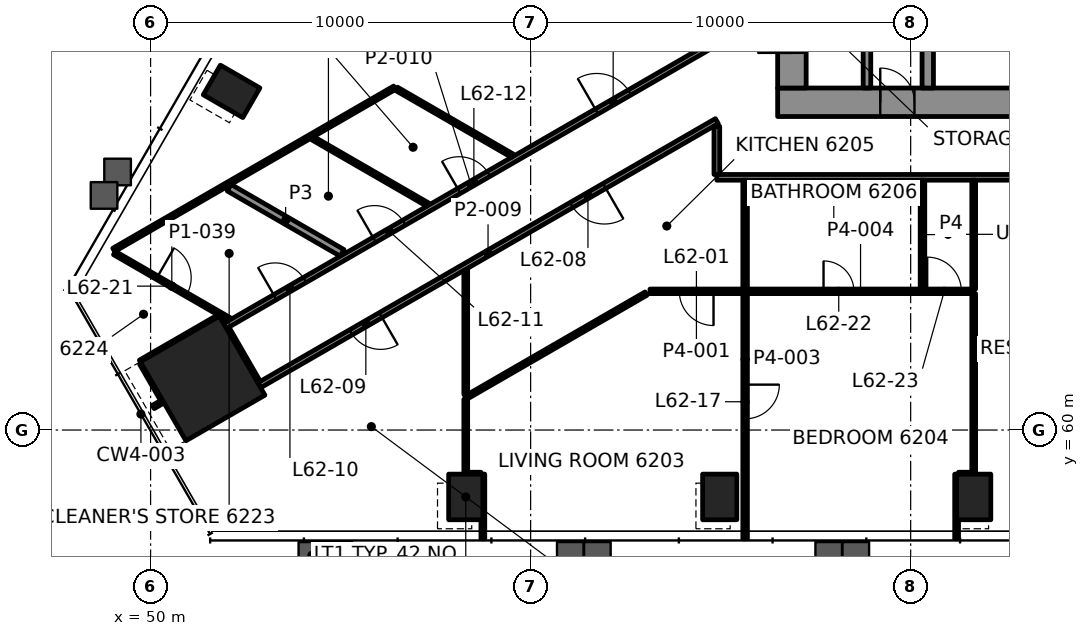
"""IFC4 building model, lengths in metres.
Left out: names, types, materials, properties, quantities, classifications, styles, units other than length and angle.
Written with IfcOpenShell. Run it as: python <this file> out.ifc"""

import sys

from ifc_helpers import new_model, si_unit, direction, frame, frame_2d, origin, origin_2d, place, context, subcontext, project, spatial, rectangle, hollow_rectangle, extrude, element, fill, save


model = new_model("IFC4")
c1 = context("Model", 3, precision=1e-05, world=origin(), true_north=direction((0.0, 1.0)))
c2 = subcontext(c1, "Body", "Model", "MODEL_VIEW")
j1 = project(units=[si_unit("LENGTHUNIT", "METRE"), si_unit("PLANEANGLEUNIT", "RADIAN")], contexts=[c1])
p1 = place(None, origin())
s1 = spatial("IfcSite", under=j1, at=p1, CompositionType="ELEMENT")
p2 = place(p1, origin())
s2 = spatial("IfcBuilding", under=s1, at=p2, CompositionType="ELEMENT")
p3 = place(p2, frame((0.0, 0.0, 263.6)))
s3 = spatial("IfcBuildingStorey", under=s2, at=p3, CompositionType="ELEMENT", Elevation=263.6)
p4 = place(p3, frame((51.37, 61.357, 0.0), z_axis=(0.0, 0.0, 1.0), x_axis=(0.5, -0.866025403784, 0.0)))
e1 = element("IfcColumn", 1, at=p4, inside=s3, PredefinedType="COLUMN", context=c2, shape_type="SweptSolid", body=[
    extrude(rectangle(XDim=2.4, YDim=2.4, at=origin_2d()), origin(), (0.0, 0.0, 1.0), 3.5),
])
for number, where, z_axis, x_axis in (
    (2, (58.293, 58.239, -0.0), (0.0, 0.0, 1.0), (1.0, 0.0, 0.0)),
    (3, (64.976, 58.239, -0.0), (0.0, 0.0, 1.0), (1.0, 0.0, 0.0)),
    (4, (71.659, 58.239, -0.0), (0.0, 0.0, 1.0), (1.0, 0.0, 0.0)),
    (5, (52.131, 68.912, -0.0), (0.0, 0.0, 1.0), (-0.5, -0.866, 0.0)),
):
    element("IfcColumn", number, at=place(p3, frame(where, z_axis=z_axis, x_axis=x_axis)), inside=s3, PredefinedType="COLUMN", context=c2, shape_type="SweptSolid", body=[
        extrude(hollow_rectangle(XDim=0.9, YDim=1.2, WallThickness=0.06, at=origin_2d()), origin(), (0.0, 0.0, 1.0), 3.5),
    ])
p5 = place(p3, frame((66.5, 68.625, 0.0), z_axis=(0.0, 0.0, 1.0), x_axis=(1.0, 0.0, 0.0)))
e6 = element("IfcWall", 6, at=p5, inside=s3, PredefinedType="SHEAR", context=c2, shape_type="SweptSolid", body=[
    extrude(rectangle(XDim=17.0, YDim=0.75, at=frame_2d((8.5, 0.0))), origin(), (0.0, 0.0, 1.0), 3.3),
])
p6 = place(p5, frame((2.7, 0.0, 0.0)))
e7 = element("IfcOpeningElement", 7, at=p6, cuts=e6, PredefinedType="OPENING", context=c2, shape_type="SweptSolid", body=[
    extrude(rectangle(XDim=0.9, YDim=2.1, at=frame_2d((0.45, 1.05))), frame((0.0, 0.385, 0.0), z_axis=(0.0, -1.0, 0.0), x_axis=(1.0, 0.0, 0.0)), (0.0, 0.0, 1.0), 0.77),
])
p7 = place(p3, frame((66.875, 69.0, 0.0), z_axis=(0.0, 0.0, 1.0), x_axis=(0.0, 1.0, 0.0)))
e8 = element("IfcWall", 8, at=p7, inside=s3, PredefinedType="SHEAR", context=c2, shape_type="SweptSolid", body=[
    extrude(rectangle(XDim=12.0, YDim=0.75, at=frame_2d((6.0, 0.0))), origin(), (0.0, 0.0, 1.0), 3.3),
])
p8 = place(p7, frame((3.7, 0.0, 0.0)))
e9 = element("IfcOpeningElement", 9, at=p8, cuts=e8, PredefinedType="OPENING", context=c2, shape_type="SweptSolid", body=[
    extrude(rectangle(XDim=1.2, YDim=2.1, at=frame_2d((0.6, 1.05))), frame((0.0, 0.385, 0.0), z_axis=(0.0, -1.0, 0.0), x_axis=(1.0, 0.0, 0.0)), (0.0, 0.0, 1.0), 0.77),
])
p9 = place(p7, frame((0.925, 0.0, 0.0)))
e10 = element("IfcOpeningElement", 10, at=p9, cuts=e8, PredefinedType="OPENING", context=c2, shape_type="SweptSolid", body=[
    extrude(rectangle(XDim=0.9, YDim=2.1, at=frame_2d((0.45, 1.05))), frame((0.0, 0.385, 0.0), z_axis=(0.0, -1.0, 0.0), x_axis=(1.0, 0.0, 0.0)), (0.0, 0.0, 1.0), 0.77),
])
p10 = place(p3, frame((70.45, 69.0, 0.0), z_axis=(0.0, 0.0, 1.0), x_axis=(0.0, 1.0, 0.0)))
e11 = element("IfcWall", 11, at=p10, inside=s3, PredefinedType="SHEAR", context=c2, shape_type="SweptSolid", body=[
    extrude(rectangle(XDim=2.6, YDim=0.3, at=frame_2d((1.3, 0.0))), origin(), (0.0, 0.0, 1.0), 3.3),
])
p11 = place(p3, frame((58.343, 58.839, 0.0), z_axis=(0.0, 0.0, 1.0), x_axis=(1.0, 0.0, 0.0)))
e12 = element("IfcWall", 12, at=p11, inside=s3, PredefinedType="PARTITIONING", context=c2, shape_type="SweptSolid", body=[
    extrude(rectangle(XDim=0.35, YDim=0.1, at=frame_2d((0.175, 0.0))), origin(), (0.0, 0.0, 1.0), 2.7),
])
p12 = place(p3, frame((71.259, 58.839, 0.0), z_axis=(0.0, 0.0, 1.0), x_axis=(1.0, 0.0, 0.0)))
e13 = element("IfcWall", 13, at=p12, inside=s3, PredefinedType="PARTITIONING", context=c2, shape_type="SweptSolid", body=[
    extrude(rectangle(XDim=0.349, YDim=0.1, at=frame_2d((0.174, 0.0))), origin(), (0.0, 0.0, 1.0), 2.7),
])
p13 = place(p3, frame((65.584, 63.65, 0.0), z_axis=(0.0, 0.0, 1.0), x_axis=(-1.0, 0.0, 0.0)))
e14 = element("IfcWall", 14, at=p13, inside=s3, PredefinedType="PARTITIONING", context=c2, shape_type="SweptSolid", body=[
    extrude(rectangle(XDim=2.443, YDim=0.12, at=frame_2d((1.221, 0.0))), origin(), (0.0, 0.0, 1.0), 2.7),
])
p14 = place(p13, frame((0.771, 0.0, 0.0)))
e15 = element("IfcOpeningElement", 15, at=p14, cuts=e14, PredefinedType="OPENING", context=c2, shape_type="SweptSolid", body=[
    extrude(rectangle(XDim=0.9, YDim=2.1, at=frame_2d((0.45, 1.05))), frame((0.0, 0.07, 0.0), z_axis=(0.0, -1.0, 0.0), x_axis=(1.0, 0.0, 0.0)), (0.0, 0.0, 1.0), 0.14),
])
p15 = place(p3, frame((85.1, 66.65, 0.0), z_axis=(0.0, 0.0, 1.0), x_axis=(-1.0, 0.0, 0.0)))
e16 = element("IfcWall", 16, at=p15, inside=s3, PredefinedType="PARTITIONING", context=c2, shape_type="SweptSolid", body=[
    extrude(rectangle(XDim=20.2, YDim=0.15, at=frame_2d((10.1, 0.0))), origin(), (0.0, 0.0, 1.0), 2.7),
])
p16 = place(p15, frame((1.61, 0.0, 0.0)))
e17 = element("IfcOpeningElement", 17, at=p16, cuts=e16, PredefinedType="OPENING", context=c2, shape_type="SweptSolid", body=[
    extrude(rectangle(XDim=1.0, YDim=2.1, at=frame_2d((0.5, 1.05))), frame((0.0, 0.085, 0.0), z_axis=(0.0, -1.0, 0.0), x_axis=(1.0, 0.0, 0.0)), (0.0, 0.0, 1.0), 0.17),
])
p17 = place(p15, frame((8.229, 0.0, 0.0)))
e18 = element("IfcOpeningElement", 18, at=p17, cuts=e16, PredefinedType="OPENING", context=c2, shape_type="SweptSolid", body=[
    extrude(rectangle(XDim=1.0, YDim=2.1, at=frame_2d((0.5, 1.05))), frame((0.0, 0.085, 0.0), z_axis=(0.0, -1.0, 0.0), x_axis=(1.0, 0.0, 0.0)), (0.0, 0.0, 1.0), 0.17),
])
p18 = place(p3, frame((58.293, 60.851, 0.0), z_axis=(0.0, 0.0, 1.0), x_axis=(0.866026762963, 0.499997645826, 0.0)))
e19 = element("IfcWall", 19, at=p18, inside=s3, PredefinedType="PARTITIONING", context=c2, shape_type="SweptSolid", body=[
    extrude(rectangle(XDim=5.478, YDim=0.1, at=frame_2d((2.739, 0.0))), origin(), (0.0, 0.0, 1.0), 2.7),
])
p19 = place(p3, frame((64.9, 68.13, 0.0), z_axis=(0.0, 0.0, 1.0), x_axis=(-0.866020369651, -0.500008719273, 0.0)))
e20 = element("IfcWall", 20, at=p19, inside=s3, PredefinedType="PARTITIONING", context=c2, shape_type="SweptSolid", body=[
    extrude(rectangle(XDim=13.904, YDim=0.15, at=frame_2d((6.952, 0.0))), origin(), (0.0, 0.0, 1.0), 2.547),
])
p20 = place(p19, frame((3.416, 0.0, 0.0)))
e21 = element("IfcOpeningElement", 21, at=p20, cuts=e20, PredefinedType="OPENING", context=c2, shape_type="SweptSolid", body=[
    extrude(rectangle(XDim=1.0, YDim=2.1, at=frame_2d((0.5, 1.05))), frame((0.0, 0.085, 0.0), z_axis=(0.0, -1.0, 0.0), x_axis=(1.0, 0.0, 0.0)), (0.0, 0.0, 1.0), 0.17),
])
p21 = place(p19, frame((10.215, 0.0, 0.0)))
e22 = element("IfcOpeningElement", 22, at=p21, cuts=e20, PredefinedType="OPENING", context=c2, shape_type="SweptSolid", body=[
    extrude(rectangle(XDim=0.9, YDim=2.1, at=frame_2d((0.45, 1.05))), frame((0.0, 0.085, 0.0), z_axis=(0.0, -1.0, 0.0), x_axis=(1.0, 0.0, 0.0)), (0.0, 0.0, 1.0), 0.17),
])
p22 = place(p3, frame((50.07, 60.607, 0.0), z_axis=(0.0, 0.0, 1.0), x_axis=(0.866071776036, 0.499919672301, 0.0)))
e23 = element("IfcWall", 23, at=p22, inside=s3, PredefinedType="PARTITIONING", context=c2, shape_type="SweptSolid", body=[
    extrude(rectangle(XDim=0.25, YDim=0.1, at=frame_2d((0.125, 0.0))), origin(), (0.0, 0.0, 1.0), 2.7),
])
p23 = place(p3, frame((51.959, 62.736, 0.0), z_axis=(0.0, 0.0, 1.0), x_axis=(0.866022614424, 0.500004831283, 0.0)))
e24 = element("IfcWall", 24, at=p23, inside=s3, PredefinedType="PARTITIONING", context=c2, shape_type="SweptSolid", body=[
    extrude(rectangle(XDim=14.943, YDim=0.15, at=frame_2d((7.472, 0.0))), origin(), (0.0, 0.0, 1.0), 2.7),
])
p24 = place(p23, frame((1.522, 0.0, 0.0)))
e25 = element("IfcOpeningElement", 25, at=p24, cuts=e24, PredefinedType="OPENING", context=c2, shape_type="SweptSolid", body=[
    extrude(rectangle(XDim=0.9, YDim=2.1, at=frame_2d((0.45, 1.05))), frame((0.0, 0.085, 0.0), z_axis=(0.0, -1.0, 0.0), x_axis=(1.0, 0.0, 0.0)), (0.0, 0.0, 1.0), 0.17),
])
p25 = place(p23, frame((4.539, 0.0, 0.0)))
e26 = element("IfcOpeningElement", 26, at=p25, cuts=e24, PredefinedType="OPENING", context=c2, shape_type="SweptSolid", body=[
    extrude(rectangle(XDim=0.9, YDim=2.1, at=frame_2d((0.45, 1.05))), frame((0.0, 0.085, 0.0), z_axis=(0.0, -1.0, 0.0), x_axis=(1.0, 0.0, 0.0)), (0.0, 0.0, 1.0), 0.17),
])
p26 = place(p23, frame((7.111, 0.0, 0.0)))
e27 = element("IfcOpeningElement", 27, at=p26, cuts=e24, PredefinedType="OPENING", context=c2, shape_type="SweptSolid", body=[
    extrude(rectangle(XDim=0.9, YDim=2.1, at=frame_2d((0.45, 1.05))), frame((0.0, 0.085, 0.0), z_axis=(0.0, -1.0, 0.0), x_axis=(1.0, 0.0, 0.0)), (0.0, 0.0, 1.0), 0.17),
])
p27 = place(p23, frame((11.294, 0.0, 0.0)))
e28 = element("IfcOpeningElement", 28, at=p27, cuts=e24, PredefinedType="OPENING", context=c2, shape_type="SweptSolid", body=[
    extrude(rectangle(XDim=1.0, YDim=2.1, at=frame_2d((0.5, 1.05))), frame((0.0, 0.085, 0.0), z_axis=(0.0, -1.0, 0.0), x_axis=(1.0, 0.0, 0.0)), (0.0, 0.0, 1.0), 0.17),
])
p28 = place(p3, frame((49.73, 61.796, 0.0), z_axis=(0.0, 0.0, 1.0), x_axis=(0.86603458294, 0.499984100898, 0.0)))
e29 = element("IfcWall", 29, at=p28, inside=s3, PredefinedType="PARTITIONING", context=c2, shape_type="SweptSolid", body=[
    extrude(rectangle(XDim=2.342, YDim=0.1, at=frame_2d((1.171, 0.0))), origin(), (0.0, 0.0, 1.0), 2.7),
])
p29 = place(p3, frame((49.03, 64.741, 0.0), z_axis=(0.0, 0.0, 1.0), x_axis=(0.866019796467, 0.500009712033, 0.0)))
e30 = element("IfcWall", 30, at=p29, inside=s3, PredefinedType="PARTITIONING", context=c2, shape_type="SweptSolid", body=[
    extrude(rectangle(XDim=8.534, YDim=0.1, at=frame_2d((4.267, 0.0))), origin(), (0.0, 0.0, 1.0), 2.7),
])
p30 = place(p3, frame((71.659, 58.84, 0.0), z_axis=(0.0, 0.0, 1.0), x_axis=(0.0, 1.0, 0.0)))
e31 = element("IfcWall", 31, at=p30, inside=s3, PredefinedType="PARTITIONING", context=c2, shape_type="SweptSolid", body=[
    extrude(rectangle(XDim=4.75, YDim=0.1, at=frame_2d((2.375, 0.0))), origin(), (0.0, 0.0, 1.0), 2.7),
])
p31 = place(p3, frame((71.209, 57.139, 0.0), z_axis=(0.0, 0.0, 1.0), x_axis=(0.0, 1.0, 0.0)))
e32 = element("IfcWall", 32, at=p31, inside=s3, PredefinedType="PARTITIONING", context=c2, shape_type="SweptSolid", body=[
    extrude(rectangle(XDim=1.699, YDim=0.1, at=frame_2d((0.85, 0.0))), origin(), (0.0, 0.0, 1.0), 2.688),
])
p32 = place(p3, frame((70.311, 63.71, 0.0), z_axis=(0.0, 0.0, 1.0), x_axis=(0.0, 1.0, 0.0)))
e33 = element("IfcWall", 33, at=p32, inside=s3, PredefinedType="PARTITIONING", context=c2, shape_type="SweptSolid", body=[
    extrude(rectangle(XDim=2.865, YDim=0.12, at=frame_2d((1.433, 0.0))), origin(), (0.0, 0.0, 1.0), 2.7),
])
p33 = place(p3, frame((65.644, 66.575, 0.0), z_axis=(0.0, 0.0, 1.0), x_axis=(0.0, -1.0, 0.0)))
e34 = element("IfcWall", 34, at=p33, inside=s3, PredefinedType="PARTITIONING", context=c2, shape_type="SweptSolid", body=[
    extrude(rectangle(XDim=9.436, YDim=0.12, at=frame_2d((4.718, 0.0))), origin(), (0.0, 0.0, 1.0), 2.688),
])
p34 = place(p33, frame((5.38, 0.0, 0.0)))
e35 = element("IfcOpeningElement", 35, at=p34, cuts=e34, PredefinedType="OPENING", context=c2, shape_type="SweptSolid", body=[
    extrude(rectangle(XDim=0.9, YDim=2.1, at=frame_2d((0.45, 1.05))), frame((0.0, 0.07, 0.0), z_axis=(0.0, -1.0, 0.0), x_axis=(1.0, 0.0, 0.0)), (0.0, 0.0, 1.0), 0.14),
])
p35 = place(p3, frame((64.9, 66.725, 0.0), z_axis=(0.0, 0.0, 1.0), x_axis=(0.0, 1.0, 0.0)))
e36 = element("IfcWall", 36, at=p35, inside=s3, PredefinedType="PARTITIONING", context=c2, shape_type="SweptSolid", body=[
    extrude(rectangle(XDim=1.268, YDim=0.15, at=frame_2d((0.634, 0.0))), origin(), (0.0, 0.0, 1.0), 2.547),
])
p36 = place(p3, frame((58.743, 57.139, 0.0), z_axis=(0.0, 0.0, 1.0), x_axis=(0.0, 1.0, 0.0)))
e37 = element("IfcWall", 37, at=p36, inside=s3, PredefinedType="PARTITIONING", context=c2, shape_type="SweptSolid", body=[
    extrude(rectangle(XDim=1.699, YDim=0.1, at=frame_2d((0.85, 0.0))), origin(), (0.0, 0.0, 1.0), 2.688),
])
p37 = place(p3, frame((58.293, 58.839, 0.0), z_axis=(0.0, 0.0, 1.0), x_axis=(0.0, 1.0, 0.0)))
e38 = element("IfcWall", 38, at=p37, inside=s3, PredefinedType="PARTITIONING", context=c2, shape_type="SweptSolid", body=[
    extrude(rectangle(XDim=1.969, YDim=0.1, at=frame_2d((0.984, 0.0))), origin(), (0.0, 0.0, 1.0), 2.7),
])
p38 = place(p3, frame((52.821, 61.243, 0.0), z_axis=(0.0, 0.0, 1.0), x_axis=(-0.499970888758, 0.866042210515, 0.0)))
e39 = element("IfcWall", 39, at=p38, inside=s3, PredefinedType="PARTITIONING", context=c2, shape_type="SweptSolid", body=[
    extrude(rectangle(XDim=1.645, YDim=0.15, at=frame_2d((0.822, 0.0))), origin(), (0.0, 0.0, 1.0), 2.547),
])
p39 = place(p3, frame((50.331, 60.757, 0.0), z_axis=(0.0, 0.0, 1.0), x_axis=(-0.500157339417, 0.865934544771, 0.0)))
e40 = element("IfcWall", 40, at=p39, inside=s3, PredefinedType="PARTITIONING", context=c2, shape_type="SweptSolid", body=[
    extrude(rectangle(XDim=1.15, YDim=0.1, at=frame_2d((0.575, 0.0))), origin(), (0.0, 0.0, 1.0), 2.7),
])
p40 = place(p3, frame((59.52, 67.219, 0.0), z_axis=(0.0, 0.0, 1.0), x_axis=(-0.866011216541, 0.500024572222, 0.0)))
e41 = element("IfcWall", 41, at=p40, inside=s3, PredefinedType="PARTITIONING", context=c2, shape_type="SweptSolid", body=[
    extrude(rectangle(XDim=3.521, YDim=0.1, at=frame_2d((1.76, 0.0))), origin(), (0.0, 0.0, 1.0), 2.7),
])
p41 = place(p3, frame((57.292, 65.932, 0.0), z_axis=(0.0, 0.0, 1.0), x_axis=(-0.866017863565, 0.500013059815, 0.0)))
e42 = element("IfcWall", 42, at=p41, inside=s3, PredefinedType="PARTITIONING", context=c2, shape_type="SweptSolid", body=[
    extrude(rectangle(XDim=3.491, YDim=0.1, at=frame_2d((1.745, 0.0))), origin(), (0.0, 0.0, 1.0), 2.7),
])
p42 = place(p3, frame((55.039, 64.662, 0.0), z_axis=(0.0, 0.0, 1.0), x_axis=(-0.866036273972, 0.49998117181, 0.0)))
e43 = element("IfcWall", 43, at=p42, inside=s3, PredefinedType="PARTITIONING", context=c2, shape_type="SweptSolid", body=[
    extrude(rectangle(XDim=3.431, YDim=0.2, at=frame_2d((1.715, 0.0))), origin(), (0.0, 0.0, 1.0), 2.7),
])
p43 = place(p3, frame((49.049, 64.658, 0.0), z_axis=(0.0, 0.0, 1.0), x_axis=(0.866031592922, -0.499989279946, 0.0)))
e44 = element("IfcWall", 44, at=p43, inside=s3, PredefinedType="PARTITIONING", context=c2, shape_type="SweptSolid", body=[
    extrude(rectangle(XDim=3.485, YDim=0.1, at=frame_2d((1.742, 0.0))), origin(), (0.0, 0.0, 1.0), 2.7),
])
p44 = place(p43, frame((1.292, 0.0, 0.0)))
e45 = element("IfcOpeningElement", 45, at=p44, cuts=e44, PredefinedType="OPENING", context=c2, shape_type="SweptSolid", body=[
    extrude(rectangle(XDim=0.9, YDim=2.1, at=frame_2d((0.45, 1.05))), frame((0.0, 0.06, 0.0), z_axis=(0.0, -1.0, 0.0), x_axis=(1.0, 0.0, 0.0)), (0.0, 0.0, 1.0), 0.12),
])
p45 = place(p3, frame((71.659, 63.71, 0.0), z_axis=(0.0, 0.0, 1.0), x_axis=(0.0, 1.0, 0.0)))
e46 = element("IfcWall", 46, at=p45, inside=s3, PredefinedType="PARTITIONING", context=c2, shape_type="SweptSolid", body=[
    extrude(rectangle(XDim=2.865, YDim=0.1, at=frame_2d((1.433, 0.0))), origin(), (0.0, 0.0, 1.0), 2.7),
])
p46 = place(p3, frame((58.293, 60.938, 0.0), z_axis=(0.0, 0.0, 1.0), x_axis=(0.0, 1.0, 0.0)))
e47 = element("IfcWall", 47, at=p46, inside=s3, PredefinedType="PARTITIONING", context=c2, shape_type="SweptSolid", body=[
    extrude(rectangle(XDim=3.261, YDim=0.1, at=frame_2d((1.63, 0.0))), origin(), (0.0, 0.0, 1.0), 2.7),
])
p47 = place(p3, frame((65.704, 63.65, 0.0), z_axis=(0.0, 0.0, 1.0), x_axis=(1.0, 0.0, 0.0)))
e48 = element("IfcWall", 48, at=p47, inside=s3, PredefinedType="PARTITIONING", context=c2, shape_type="SweptSolid", body=[
    extrude(rectangle(XDim=5.955, YDim=0.12, at=frame_2d((2.977, 0.0))), origin(), (0.0, 0.0, 1.0), 2.7),
])
p48 = place(p47, frame((2.003, 0.0, 0.0)))
e49 = element("IfcOpeningElement", 49, at=p48, cuts=e48, PredefinedType="OPENING", context=c2, shape_type="SweptSolid", body=[
    extrude(rectangle(XDim=0.8, YDim=2.1, at=frame_2d((0.4, 1.05))), frame((0.0, 0.07, 0.0), z_axis=(0.0, -1.0, 0.0), x_axis=(1.0, 0.0, 0.0)), (0.0, 0.0, 1.0), 0.14),
])
p49 = place(p47, frame((4.731, 0.0, 0.0)))
e50 = element("IfcOpeningElement", 50, at=p49, cuts=e48, PredefinedType="OPENING", context=c2, shape_type="SweptSolid", body=[
    extrude(rectangle(XDim=0.9, YDim=2.1, at=frame_2d((0.45, 1.05))), frame((0.0, 0.07, 0.0), z_axis=(0.0, -1.0, 0.0), x_axis=(1.0, 0.0, 0.0)), (0.0, 0.0, 1.0), 0.14),
])
p50 = place(p3, frame((68.85, 69.0, 0.0), z_axis=(0.0, 0.0, 1.0), x_axis=(0.0, 1.0, 0.0)))
e51 = element("IfcWall", 51, at=p50, inside=s3, PredefinedType="PARTITIONING", context=c2, shape_type="SweptSolid", body=[
    extrude(rectangle(XDim=2.65, YDim=0.2, at=frame_2d((1.325, 0.0))), origin(), (0.0, 0.0, 1.0), 3.3),
])
p51 = place(p14, origin())
e52 = element("IfcDoor", 52, at=p51, inside=s3, OperationType="SINGLE_SWING_LEFT", PredefinedType="DOOR", context=c2, shape_type="SweptSolid", body=[
    extrude(rectangle(XDim=0.9, YDim=2.1, at=frame_2d((0.45, 1.05))), frame((0.0, 0.025, 0.0), z_axis=(0.0, -1.0, 0.0), x_axis=(1.0, 0.0, 0.0)), (0.0, 0.0, 1.0), 0.05),
])
fill(e15, e52)
p52 = place(p20, origin())
e53 = element("IfcDoor", 53, at=p52, inside=s3, OperationType="SINGLE_SWING_RIGHT", PredefinedType="DOOR", context=c2, shape_type="SweptSolid", body=[
    extrude(rectangle(XDim=1.0, YDim=2.1, at=frame_2d((0.5, 1.05))), frame((0.0, 0.025, 0.0), z_axis=(0.0, -1.0, 0.0), x_axis=(1.0, 0.0, 0.0)), (0.0, 0.0, 1.0), 0.05),
])
fill(e21, e53)
p53 = place(p21, origin())
e54 = element("IfcDoor", 54, at=p53, inside=s3, OperationType="SINGLE_SWING_RIGHT", PredefinedType="DOOR", context=c2, shape_type="SweptSolid", body=[
    extrude(rectangle(XDim=0.9, YDim=2.1, at=frame_2d((0.45, 1.05))), frame((0.0, 0.025, 0.0), z_axis=(0.0, -1.0, 0.0), x_axis=(1.0, 0.0, 0.0)), (0.0, 0.0, 1.0), 0.05),
])
fill(e22, e54)
p54 = place(p24, origin())
e55 = element("IfcDoor", 55, at=p54, inside=s3, OperationType="SINGLE_SWING_RIGHT", PredefinedType="DOOR", context=c2, shape_type="SweptSolid", body=[
    extrude(rectangle(XDim=0.9, YDim=2.1, at=frame_2d((0.45, 1.05))), frame((0.0, 0.025, 0.0), z_axis=(0.0, -1.0, 0.0), x_axis=(1.0, 0.0, 0.0)), (0.0, 0.0, 1.0), 0.05),
])
fill(e25, e55)
p55 = place(p25, origin())
e56 = element("IfcDoor", 56, at=p55, inside=s3, OperationType="SINGLE_SWING_LEFT", PredefinedType="DOOR", context=c2, shape_type="SweptSolid", body=[
    extrude(rectangle(XDim=0.9, YDim=2.1, at=frame_2d((0.45, 1.05))), frame((0.0, 0.025, 0.0), z_axis=(0.0, -1.0, 0.0), x_axis=(1.0, 0.0, 0.0)), (0.0, 0.0, 1.0), 0.05),
])
fill(e26, e56)
p56 = place(p26, origin())
e57 = element("IfcDoor", 57, at=p56, inside=s3, OperationType="SINGLE_SWING_RIGHT", PredefinedType="DOOR", context=c2, shape_type="SweptSolid", body=[
    extrude(rectangle(XDim=0.9, YDim=2.1, at=frame_2d((0.45, 1.05))), frame((0.0, 0.025, 0.0), z_axis=(0.0, -1.0, 0.0), x_axis=(1.0, 0.0, 0.0)), (0.0, 0.0, 1.0), 0.05),
])
fill(e27, e57)
p57 = place(p27, origin())
e58 = element("IfcDoor", 58, at=p57, inside=s3, OperationType="SINGLE_SWING_LEFT", PredefinedType="DOOR", context=c2, shape_type="SweptSolid", body=[
    extrude(rectangle(XDim=1.0, YDim=2.1, at=frame_2d((0.5, 1.05))), frame((0.0, 0.025, 0.0), z_axis=(0.0, -1.0, 0.0), x_axis=(1.0, 0.0, 0.0)), (0.0, 0.0, 1.0), 0.05),
])
fill(e28, e58)
p58 = place(p34, origin())
e59 = element("IfcDoor", 59, at=p58, inside=s3, OperationType="SINGLE_SWING_LEFT", PredefinedType="DOOR", context=c2, shape_type="SweptSolid", body=[
    extrude(rectangle(XDim=0.9, YDim=2.1, at=frame_2d((0.45, 1.05))), frame((0.0, 0.025, 0.0), z_axis=(0.0, -1.0, 0.0), x_axis=(1.0, 0.0, 0.0)), (0.0, 0.0, 1.0), 0.05),
])
fill(e35, e59)
p59 = place(p44, origin())
e60 = element("IfcDoor", 60, at=p59, inside=s3, OperationType="SINGLE_SWING_RIGHT", PredefinedType="DOOR", context=c2, shape_type="SweptSolid", body=[
    extrude(rectangle(XDim=0.9, YDim=2.1, at=frame_2d((0.45, 1.05))), frame((0.0, 0.025, 0.0), z_axis=(0.0, -1.0, 0.0), x_axis=(1.0, 0.0, 0.0)), (0.0, 0.0, 1.0), 0.05),
])
fill(e45, e60)
p60 = place(p48, origin())
e61 = element("IfcDoor", 61, at=p60, inside=s3, OperationType="SINGLE_SWING_RIGHT", PredefinedType="DOOR", context=c2, shape_type="SweptSolid", body=[
    extrude(rectangle(XDim=0.8, YDim=2.1, at=frame_2d((0.4, 1.05))), frame((0.0, 0.025, 0.0), z_axis=(0.0, -1.0, 0.0), x_axis=(1.0, 0.0, 0.0)), (0.0, 0.0, 1.0), 0.05),
])
fill(e49, e61)
p61 = place(p49, origin())
e62 = element("IfcDoor", 62, at=p61, inside=s3, OperationType="SINGLE_SWING_LEFT", PredefinedType="DOOR", context=c2, shape_type="SweptSolid", body=[
    extrude(rectangle(XDim=0.9, YDim=2.1, at=frame_2d((0.45, 1.05))), frame((0.0, 0.025, 0.0), z_axis=(0.0, -1.0, 0.0), x_axis=(1.0, 0.0, 0.0)), (0.0, 0.0, 1.0), 0.05),
])
fill(e50, e62)
p62 = place(p9, origin())
e63 = element("IfcDoor", 63, at=p62, inside=s3, OperationType="SINGLE_SWING_RIGHT", PredefinedType="DOOR", context=c2, shape_type="SweptSolid", body=[
    extrude(rectangle(XDim=0.9, YDim=2.1, at=frame_2d((0.45, 1.05))), frame((0.0, 0.095, 0.0), z_axis=(0.0, -1.0, 0.0), x_axis=(1.0, 0.0, 0.0)), (0.0, 0.0, 1.0), 0.19),
])
fill(e10, e63)
p63 = place(p6, origin())
e64 = element("IfcDoor", 64, at=p63, inside=s3, OperationType="SINGLE_SWING_LEFT", PredefinedType="DOOR", context=c2, shape_type="SweptSolid", body=[
    extrude(rectangle(XDim=0.9, YDim=2.1, at=frame_2d((0.45, 1.05))), frame((0.0, 0.095, 0.0), z_axis=(0.0, -1.0, 0.0), x_axis=(1.0, 0.0, 0.0)), (0.0, 0.0, 1.0), 0.19),
])
fill(e7, e64)
save(model, sys.argv[1])
